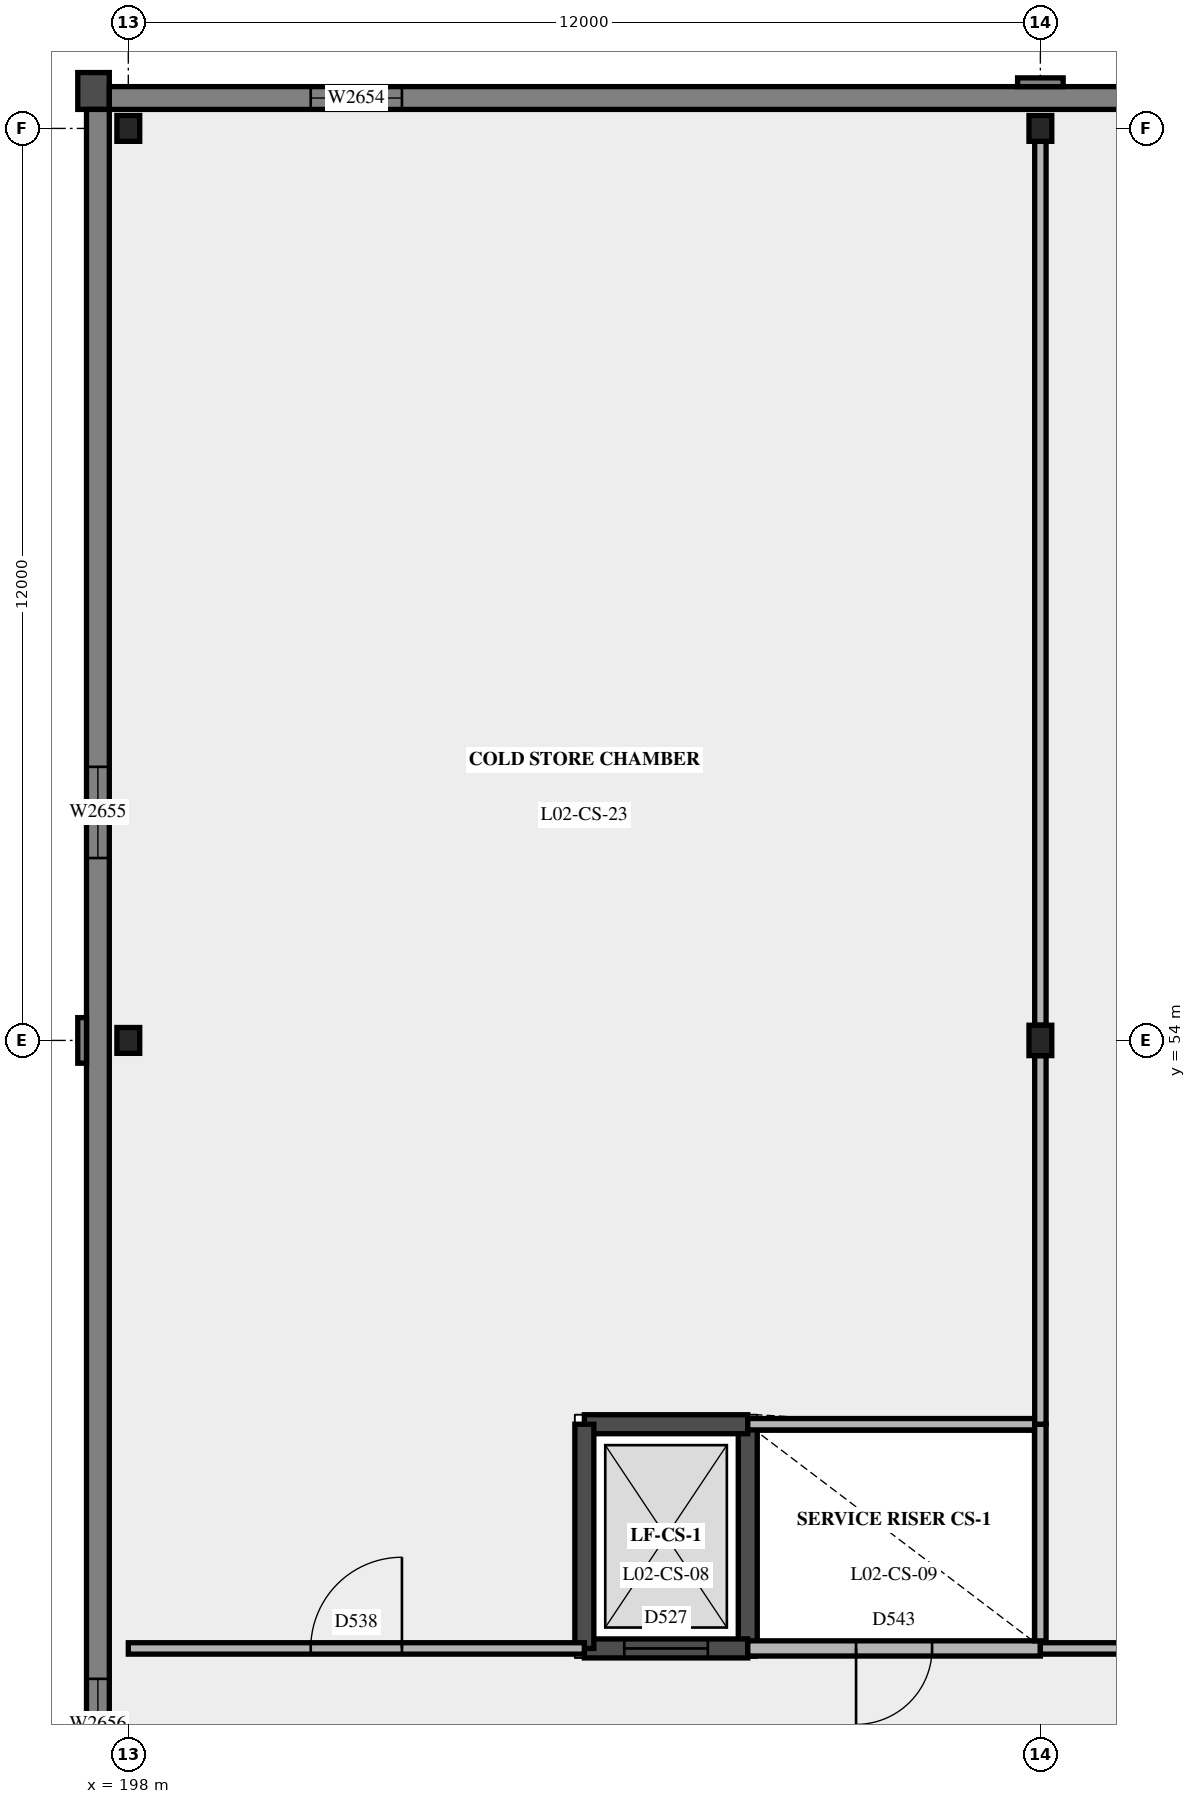
"""IFC4 building model, lengths in metres.
Left out: names, types, materials, properties, quantities, classifications, styles, units other than length and angle.
Written with IfcOpenShell. Run it as: python <this file> out.ifc"""

import sys

from ifc_helpers import new_model, si_unit, direction, frame, frame_2d, origin, origin_2d, place, context, subcontext, project, spatial, polyline, rectangle, i_section, outline, extrude, element, fill, save


model = new_model("IFC4")
c1 = context("Model", 3, precision=1e-05, world=origin(), true_north=direction((0.0, 1.0)))
c2 = subcontext(c1, "Body", "Model", "MODEL_VIEW")
j1 = project(units=[si_unit("LENGTHUNIT", "METRE"), si_unit("PLANEANGLEUNIT", "RADIAN")], contexts=[c1])
p1 = place(None, origin())
s1 = spatial("IfcSite", under=j1, at=p1, CompositionType="ELEMENT")
p2 = place(p1, origin())
s2 = spatial("IfcBuilding", under=s1, at=p2, CompositionType="ELEMENT")
p3 = place(p2, frame((0.0, 0.0, 10.8)))
s3 = spatial("IfcBuildingStorey", under=s2, at=p3, CompositionType="ELEMENT", Elevation=10.8)
for number, where, z_axis, x_axis in (
    (1, (198.0, 54.0, 0.0), (0.0, 0.0, 1.0), (1.0, 0.0, 0.0)),
    (2, (198.0, 66.0, 0.0), (0.0, 0.0, 1.0), (1.0, 0.0, 0.0)),
):
    element("IfcColumn", number, at=place(p3, frame(where, z_axis=z_axis, x_axis=x_axis)), inside=s3, PredefinedType="COLUMN", context=c2, shape_type="SweptSolid", body=[
        extrude(i_section(OverallWidth=0.3, OverallDepth=0.34, WebThickness=0.012, FlangeThickness=0.021, at=origin_2d()), origin(), (0.0, 0.0, 1.0), 5.4),
    ])
p4 = place(p3, frame((210.0, 54.0, 0.0), z_axis=(0.0, 0.0, 1.0), x_axis=(1.0, 0.0, 0.0)))
e3 = element("IfcColumn", 3, at=p4, inside=s3, PredefinedType="COLUMN", context=c2, shape_type="SweptSolid", body=[
    extrude(i_section(OverallWidth=0.3, OverallDepth=0.4, WebThickness=0.013, FlangeThickness=0.024, at=origin_2d()), origin(), (0.0, 0.0, 1.0), 5.4),
])
p5 = place(p3, frame((210.0, 66.0, 0.0), z_axis=(0.0, 0.0, 1.0), x_axis=(1.0, 0.0, 0.0)))
e4 = element("IfcColumn", 4, at=p5, inside=s3, PredefinedType="COLUMN", context=c2, shape_type="SweptSolid", body=[
    extrude(i_section(OverallWidth=0.3, OverallDepth=0.34, WebThickness=0.012, FlangeThickness=0.021, at=origin_2d()), origin(), (0.0, 0.0, 1.0), 5.4),
])
p6 = place(p3, frame((197.75, 66.492, 0.0), z_axis=(0.0, 0.0, 1.0), x_axis=(-1.0, 0.0, 0.0)))
e5 = element("IfcWall", 5, at=p6, inside=s3, PredefinedType="SOLIDWALL", context=c2, shape_type="SweptSolid", body=[
    extrude(rectangle(XDim=0.415, YDim=0.485, at=frame_2d((0.208, 0.0))), origin(), (0.0, 0.0, 1.0), 5.01),
])
p7 = place(p3, frame((197.75, 66.528, 5.01), z_axis=(0.0, 0.0, 1.0), x_axis=(-1.0, 0.0, 0.0)))
e6 = element("IfcWall", 6, at=p7, inside=s3, PredefinedType="SOLIDWALL", context=c2, shape_type="SweptSolid", body=[
    extrude(rectangle(XDim=0.53, YDim=0.555, at=frame_2d((0.265, 0.0))), origin(), (0.0, 0.0, 1.0), 0.13),
])
p8 = place(p3, frame((197.75, 66.562, 5.14), z_axis=(0.0, 0.0, 1.0), x_axis=(-1.0, 0.0, 0.0)))
e7 = element("IfcWall", 7, at=p8, inside=s3, PredefinedType="SOLIDWALL", context=c2, shape_type="SweptSolid", body=[
    extrude(rectangle(XDim=0.645, YDim=0.625, at=frame_2d((0.323, 0.0))), origin(), (0.0, 0.0, 1.0), 0.13),
])
p9 = place(p3, frame((197.75, 66.597, 5.27), z_axis=(0.0, 0.0, 1.0), x_axis=(-1.0, 0.0, 0.0)))
e8 = element("IfcWall", 8, at=p9, inside=s3, PredefinedType="SOLIDWALL", context=c2, shape_type="SweptSolid", body=[
    extrude(rectangle(XDim=0.76, YDim=0.695, at=frame_2d((0.38, 0.0))), origin(), (0.0, 0.0, 1.0), 0.13),
])
p10 = place(p3, frame((282.25, 66.4, 0.0), z_axis=(0.0, 0.0, 1.0), x_axis=(-1.0, 0.0, 0.0)))
e9 = element("IfcWall", 9, at=p10, inside=s3, PredefinedType="SOLIDWALL", context=c2, shape_type="SweptSolid", body=[
    extrude(rectangle(XDim=84.5, YDim=0.3, at=frame_2d((42.25, 0.0))), origin(), (0.0, 0.0, 1.0), 5.4),
])
p11 = place(p10, frame((8.65, 0.0, 1.2)))
e10 = element("IfcOpeningElement", 10, at=p11, cuts=e9, PredefinedType="OPENING", context=c2, shape_type="SweptSolid", body=[
    extrude(rectangle(XDim=1.2, YDim=1.5, at=frame_2d((0.6, 0.75))), frame((0.0, 0.16, 0.0), z_axis=(0.0, -1.0, 0.0), x_axis=(1.0, 0.0, 0.0)), (0.0, 0.0, 1.0), 0.32),
])
p12 = place(p10, frame((20.65, 0.0, 1.2)))
e11 = element("IfcOpeningElement", 11, at=p12, cuts=e9, PredefinedType="OPENING", context=c2, shape_type="SweptSolid", body=[
    extrude(rectangle(XDim=1.2, YDim=1.5, at=frame_2d((0.6, 0.75))), frame((0.0, 0.16, 0.0), z_axis=(0.0, -1.0, 0.0), x_axis=(1.0, 0.0, 0.0)), (0.0, 0.0, 1.0), 0.32),
])
p13 = place(p10, frame((32.65, 0.0, 1.2)))
e12 = element("IfcOpeningElement", 12, at=p13, cuts=e9, PredefinedType="OPENING", context=c2, shape_type="SweptSolid", body=[
    extrude(rectangle(XDim=1.2, YDim=1.5, at=frame_2d((0.6, 0.75))), frame((0.0, 0.16, 0.0), z_axis=(0.0, -1.0, 0.0), x_axis=(1.0, 0.0, 0.0)), (0.0, 0.0, 1.0), 0.32),
])
p14 = place(p10, frame((44.65, 0.0, 1.2)))
e13 = element("IfcOpeningElement", 13, at=p14, cuts=e9, PredefinedType="OPENING", context=c2, shape_type="SweptSolid", body=[
    extrude(rectangle(XDim=1.2, YDim=1.5, at=frame_2d((0.6, 0.75))), frame((0.0, 0.16, 0.0), z_axis=(0.0, -1.0, 0.0), x_axis=(1.0, 0.0, 0.0)), (0.0, 0.0, 1.0), 0.32),
])
p15 = place(p10, frame((56.65, 0.0, 1.2)))
e14 = element("IfcOpeningElement", 14, at=p15, cuts=e9, PredefinedType="OPENING", context=c2, shape_type="SweptSolid", body=[
    extrude(rectangle(XDim=1.2, YDim=1.5, at=frame_2d((0.6, 0.75))), frame((0.0, 0.16, 0.0), z_axis=(0.0, -1.0, 0.0), x_axis=(1.0, 0.0, 0.0)), (0.0, 0.0, 1.0), 0.32),
])
p16 = place(p10, frame((68.65, 0.0, 1.2)))
e15 = element("IfcOpeningElement", 15, at=p16, cuts=e9, PredefinedType="OPENING", context=c2, shape_type="SweptSolid", body=[
    extrude(rectangle(XDim=1.2, YDim=1.5, at=frame_2d((0.6, 0.75))), frame((0.0, 0.16, 0.0), z_axis=(0.0, -1.0, 0.0), x_axis=(1.0, 0.0, 0.0)), (0.0, 0.0, 1.0), 0.32),
])
p17 = place(p10, frame((80.65, 0.0, 1.2)))
e16 = element("IfcOpeningElement", 16, at=p17, cuts=e9, PredefinedType="OPENING", context=c2, shape_type="SweptSolid", body=[
    extrude(rectangle(XDim=1.2, YDim=1.5, at=frame_2d((0.6, 0.75))), frame((0.0, 0.16, 0.0), z_axis=(0.0, -1.0, 0.0), x_axis=(1.0, 0.0, 0.0)), (0.0, 0.0, 1.0), 0.32),
])
p18 = place(p3, frame((210.3, 66.607, 0.0), z_axis=(0.0, 0.0, 1.0), x_axis=(-1.0, 0.0, 0.0)))
e17 = element("IfcWall", 17, at=p18, inside=s3, PredefinedType="SOLIDWALL", context=c2, shape_type="SweptSolid", body=[
    extrude(rectangle(XDim=0.6, YDim=0.115, at=frame_2d((0.3, 0.0))), origin(), (0.0, 0.0, 1.0), 5.4),
])
p19 = place(p3, frame((197.6, 66.25, 0.0), z_axis=(0.0, 0.0, 1.0), x_axis=(0.0, -1.0, 0.0)))
e18 = element("IfcWall", 18, at=p19, inside=s3, PredefinedType="SOLIDWALL", context=c2, shape_type="SweptSolid", body=[
    extrude(rectangle(XDim=48.5, YDim=0.3, at=frame_2d((24.25, 0.0))), origin(), (0.0, 0.0, 1.0), 5.4),
])
p20 = place(p19, frame((8.65, 0.0, 1.2)))
e19 = element("IfcOpeningElement", 19, at=p20, cuts=e18, PredefinedType="OPENING", context=c2, shape_type="SweptSolid", body=[
    extrude(rectangle(XDim=1.2, YDim=1.5, at=frame_2d((0.6, 0.75))), frame((0.0, 0.16, 0.0), z_axis=(0.0, -1.0, 0.0), x_axis=(1.0, 0.0, 0.0)), (0.0, 0.0, 1.0), 0.32),
])
p21 = place(p19, frame((20.65, 0.0, 1.2)))
e20 = element("IfcOpeningElement", 20, at=p21, cuts=e18, PredefinedType="OPENING", context=c2, shape_type="SweptSolid", body=[
    extrude(rectangle(XDim=1.2, YDim=1.5, at=frame_2d((0.6, 0.75))), frame((0.0, 0.16, 0.0), z_axis=(0.0, -1.0, 0.0), x_axis=(1.0, 0.0, 0.0)), (0.0, 0.0, 1.0), 0.32),
])
p22 = place(p19, frame((32.65, 0.0, 1.2)))
e21 = element("IfcOpeningElement", 21, at=p22, cuts=e18, PredefinedType="OPENING", context=c2, shape_type="SweptSolid", body=[
    extrude(rectangle(XDim=1.2, YDim=1.5, at=frame_2d((0.6, 0.75))), frame((0.0, 0.16, 0.0), z_axis=(0.0, -1.0, 0.0), x_axis=(1.0, 0.0, 0.0)), (0.0, 0.0, 1.0), 0.32),
])
p23 = place(p19, frame((44.65, 0.0, 1.2)))
e22 = element("IfcOpeningElement", 22, at=p23, cuts=e18, PredefinedType="OPENING", context=c2, shape_type="SweptSolid", body=[
    extrude(rectangle(XDim=1.2, YDim=1.5, at=frame_2d((0.6, 0.75))), frame((0.0, 0.16, 0.0), z_axis=(0.0, -1.0, 0.0), x_axis=(1.0, 0.0, 0.0)), (0.0, 0.0, 1.0), 0.32),
])
p24 = place(p3, frame((197.393, 54.3, 0.0), z_axis=(0.0, 0.0, 1.0), x_axis=(0.0, -1.0, 0.0)))
e23 = element("IfcWall", 23, at=p24, inside=s3, PredefinedType="SOLIDWALL", context=c2, shape_type="SweptSolid", body=[
    extrude(rectangle(XDim=0.6, YDim=0.115, at=frame_2d((0.3, 0.0))), origin(), (0.0, 0.0, 1.0), 5.4),
])
p25 = place(p3, frame((206.15, 46.0, 0.0), z_axis=(0.0, 0.0, 1.0), x_axis=(0.0, 1.0, 0.0)))
e24 = element("IfcWall", 24, at=p25, inside=s3, PredefinedType="SHEAR", context=c2, shape_type="SweptSolid", body=[
    extrude(rectangle(XDim=2.95, YDim=0.25, at=frame_2d((1.475, 0.0))), origin(), (0.0, 0.0, 1.0), 5.4),
])
p26 = place(p3, frame((206.15, 48.95, 0.0), z_axis=(0.0, 0.0, 1.0), x_axis=(-1.0, 0.0, 0.0)))
e25 = element("IfcWall", 25, at=p26, inside=s3, PredefinedType="SHEAR", context=c2, shape_type="SweptSolid", body=[
    extrude(rectangle(XDim=2.15, YDim=0.25, at=frame_2d((1.075, 0.0))), origin(), (0.0, 0.0, 1.0), 5.4),
])
p27 = place(p3, frame((204.0, 46.0, 0.0), z_axis=(0.0, 0.0, 1.0), x_axis=(1.0, 0.0, 0.0)))
e26 = element("IfcWall", 26, at=p27, inside=s3, PredefinedType="SHEAR", context=c2, shape_type="SweptSolid", body=[
    extrude(rectangle(XDim=2.15, YDim=0.25, at=frame_2d((1.075, 0.0))), origin(), (0.0, 0.0, 1.0), 5.4),
])
p28 = place(p27, frame((0.525, 0.0, 0.0)))
e27 = element("IfcOpeningElement", 27, at=p28, cuts=e26, PredefinedType="OPENING", context=c2, shape_type="SweptSolid", body=[
    extrude(rectangle(XDim=1.1, YDim=2.1, at=frame_2d((0.55, 1.05))), frame((0.0, 0.135, 0.0), z_axis=(0.0, -1.0, 0.0), x_axis=(1.0, 0.0, 0.0)), (0.0, 0.0, 1.0), 0.27),
])
p29 = place(p3, frame((204.0, 48.95, 0.0), z_axis=(0.0, 0.0, 1.0), x_axis=(0.0, -1.0, 0.0)))
e28 = element("IfcWall", 28, at=p29, inside=s3, PredefinedType="SHEAR", context=c2, shape_type="SweptSolid", body=[
    extrude(rectangle(XDim=2.95, YDim=0.25, at=frame_2d((1.475, 0.0))), origin(), (0.0, 0.0, 1.0), 5.4),
])
p30 = place(p3, frame((198.0, 46.0, 0.0), z_axis=(0.0, 0.0, 1.0), x_axis=(1.0, 0.0, 0.0)))
e29 = element("IfcWall", 29, at=p30, inside=s3, PredefinedType="PARTITIONING", context=c2, shape_type="SweptSolid", body=[
    extrude(outline(polyline([(0.0, 0.0), (6.0, 0.0), (6.0, 5.15), (4.905, 5.15), (4.9, 4.63), (4.7, 4.63), (4.695, 5.15), (2.505, 5.15), (2.5, 4.63), (2.3, 4.63), (2.295, 5.15), (0.1, 5.15), (0.095, 4.68), (0.0, 4.68), (0.0, 0.0)])), frame((0.0, 0.075, 0.0), z_axis=(0.0, -1.0, 0.0), x_axis=(1.0, 0.0, 0.0)), (0.0, 0.0, 1.0), 0.15),
])
p31 = place(p30, frame((2.4, 0.0, 0.0)))
e30 = element("IfcOpeningElement", 30, at=p31, cuts=e29, PredefinedType="OPENING", context=c2, shape_type="SweptSolid", body=[
    extrude(rectangle(XDim=1.2, YDim=2.4, at=frame_2d((0.6, 1.2))), frame((0.0, 0.085, 0.0), z_axis=(0.0, -1.0, 0.0), x_axis=(1.0, 0.0, 0.0)), (0.0, 0.0, 1.0), 0.17),
])
p32 = place(p3, frame((206.15, 46.0, 0.0), z_axis=(0.0, 0.0, 1.0), x_axis=(1.0, 0.0, 0.0)))
e31 = element("IfcWall", 31, at=p32, inside=s3, PredefinedType="PARTITIONING", context=c2, shape_type="SweptSolid", body=[
    extrude(outline(polyline([(0.0, 0.0), (3.85, 0.0), (3.85, 4.68), (3.755, 4.68), (3.75, 5.15), (1.555, 5.15), (1.55, 4.63), (1.35, 4.63), (1.345, 5.15), (0.0, 5.15), (0.0, 0.0)])), frame((0.0, 0.1, 0.0), z_axis=(0.0, -1.0, 0.0), x_axis=(1.0, 0.0, 0.0)), (0.0, 0.0, 1.0), 0.2),
])
p33 = place(p32, frame((1.425, 0.0, 0.0)))
e32 = element("IfcOpeningElement", 32, at=p33, cuts=e31, PredefinedType="OPENING", context=c2, shape_type="SweptSolid", body=[
    extrude(rectangle(XDim=1.0, YDim=2.1, at=frame_2d((0.5, 1.05))), frame((0.0, 0.11, 0.0), z_axis=(0.0, -1.0, 0.0), x_axis=(1.0, 0.0, 0.0)), (0.0, 0.0, 1.0), 0.22),
])
p34 = place(p3, frame((210.0, 46.0, 0.0), z_axis=(0.0, 0.0, 1.0), x_axis=(1.0, 0.0, 0.0)))
e33 = element("IfcWall", 33, at=p34, inside=s3, PredefinedType="PARTITIONING", context=c2, shape_type="SweptSolid", body=[
    extrude(outline(polyline([(0.0, 0.0), (12.0, 0.0), (12.0, 5.15), (9.705, 5.15), (9.7, 4.63), (9.5, 4.63), (9.495, 5.15), (7.305, 5.15), (7.3, 4.63), (7.1, 4.63), (7.095, 5.15), (4.905, 5.15), (4.9, 4.63), (4.7, 4.63), (4.695, 5.15), (2.505, 5.15), (2.5, 4.63), (2.3, 4.63), (2.295, 5.15), (0.1, 5.15), (0.095, 4.68), (0.0, 4.68), (0.0, 0.0)])), frame((0.0, 0.075, 0.0), z_axis=(0.0, -1.0, 0.0), x_axis=(1.0, 0.0, 0.0)), (0.0, 0.0, 1.0), 0.15),
])
p35 = place(p34, frame((5.4, 0.0, 0.0)))
e34 = element("IfcOpeningElement", 34, at=p35, cuts=e33, PredefinedType="OPENING", context=c2, shape_type="SweptSolid", body=[
    extrude(rectangle(XDim=1.2, YDim=2.4, at=frame_2d((0.6, 1.2))), frame((0.0, 0.085, 0.0), z_axis=(0.0, -1.0, 0.0), x_axis=(1.0, 0.0, 0.0)), (0.0, 0.0, 1.0), 0.17),
])
p36 = place(p3, frame((206.15, 48.95, 0.0), z_axis=(0.0, 0.0, 1.0), x_axis=(1.0, 0.0, 0.0)))
e35 = element("IfcWall", 35, at=p36, inside=s3, PredefinedType="PARTITIONING", context=c2, shape_type="SweptSolid", body=[
    extrude(outline(polyline([(0.0, 0.0), (3.775, 0.0), (3.775, 4.68), (3.755, 4.68), (3.75, 5.15), (1.555, 5.15), (1.55, 4.63), (1.35, 4.63), (1.345, 5.15), (0.0, 5.15), (0.0, 0.0)])), frame((0.0, 0.075, 0.0), z_axis=(0.0, -1.0, 0.0), x_axis=(1.0, 0.0, 0.0)), (0.0, 0.0, 1.0), 0.15),
])
p37 = place(p3, frame((210.0, 46.1, 0.0), z_axis=(0.0, 0.0, 1.0), x_axis=(0.0, 1.0, 0.0)))
e36 = element("IfcWall", 36, at=p37, inside=s3, PredefinedType="PARTITIONING", context=c2, shape_type="SweptSolid", body=[
    extrude(rectangle(XDim=2.85, YDim=0.15, at=frame_2d((1.425, 0.0))), origin(), (0.0, 0.0, 1.0), 4.68),
])
p38 = place(p3, frame((210.0, 48.95, 0.0), z_axis=(0.0, 0.0, 1.0), x_axis=(0.0, 1.0, 0.0)))
e37 = element("IfcWall", 37, at=p38, inside=s3, PredefinedType="PARTITIONING", context=c2, shape_type="SweptSolid", body=[
    extrude(rectangle(XDim=4.85, YDim=0.15, at=frame_2d((2.425, 0.0))), origin(), (0.0, 0.0, 1.0), 4.68),
])
p39 = place(p3, frame((210.0, 54.2, 0.0), z_axis=(0.0, 0.0, 1.0), x_axis=(0.0, 1.0, 0.0)))
e38 = element("IfcWall", 38, at=p39, inside=s3, PredefinedType="PARTITIONING", context=c2, shape_type="SweptSolid", body=[
    extrude(rectangle(XDim=11.63, YDim=0.15, at=frame_2d((5.815, 0.0))), origin(), (0.0, 0.0, 1.0), 4.68),
])
p40 = place(p17, origin())
e39 = element("IfcWindow", 39, at=p40, inside=s3, PartitioningType="SINGLE_PANEL", PredefinedType="WINDOW", context=c2, shape_type="SweptSolid", body=[
    extrude(rectangle(XDim=1.2, YDim=1.5, at=frame_2d((0.6, 0.75))), frame((0.0, 0.03, 0.0), z_axis=(0.0, -1.0, 0.0), x_axis=(1.0, 0.0, 0.0)), (0.0, 0.0, 1.0), 0.06),
])
fill(e16, e39)
p41 = place(p20, origin())
e40 = element("IfcWindow", 40, at=p41, inside=s3, PartitioningType="SINGLE_PANEL", PredefinedType="WINDOW", context=c2, shape_type="SweptSolid", body=[
    extrude(rectangle(XDim=1.2, YDim=1.5, at=frame_2d((0.6, 0.75))), frame((0.0, 0.03, 0.0), z_axis=(0.0, -1.0, 0.0), x_axis=(1.0, 0.0, 0.0)), (0.0, 0.0, 1.0), 0.06),
])
fill(e19, e40)
p42 = place(p21, origin())
e41 = element("IfcWindow", 41, at=p42, inside=s3, PartitioningType="SINGLE_PANEL", PredefinedType="WINDOW", context=c2, shape_type="SweptSolid", body=[
    extrude(rectangle(XDim=1.2, YDim=1.5, at=frame_2d((0.6, 0.75))), frame((0.0, 0.03, 0.0), z_axis=(0.0, -1.0, 0.0), x_axis=(1.0, 0.0, 0.0)), (0.0, 0.0, 1.0), 0.06),
])
fill(e20, e41)
p43 = place(p28, origin())
e42 = element("IfcDoor", 42, at=p43, inside=s3, OperationType="SLIDING_TO_LEFT", PredefinedType="DOOR", context=c2, shape_type="SweptSolid", body=[
    extrude(rectangle(XDim=1.1, YDim=2.1, at=frame_2d((0.55, 1.05))), frame((0.0, 0.025, 0.0), z_axis=(0.0, -1.0, 0.0), x_axis=(1.0, 0.0, 0.0)), (0.0, 0.0, 1.0), 0.05),
])
fill(e27, e42)
p44 = place(p31, origin())
e43 = element("IfcDoor", 43, at=p44, inside=s3, OperationType="SINGLE_SWING_RIGHT", PredefinedType="DOOR", context=c2, shape_type="SweptSolid", body=[
    extrude(rectangle(XDim=1.2, YDim=2.4, at=frame_2d((0.6, 1.2))), frame((0.0, 0.025, 0.0), z_axis=(0.0, -1.0, 0.0), x_axis=(1.0, 0.0, 0.0)), (0.0, 0.0, 1.0), 0.05),
])
fill(e30, e43)
p45 = place(p33, origin())
e44 = element("IfcDoor", 44, at=p45, inside=s3, OperationType="SINGLE_SWING_RIGHT", PredefinedType="DOOR", context=c2, shape_type="SweptSolid", body=[
    extrude(rectangle(XDim=1.0, YDim=2.1, at=frame_2d((0.5, 1.05))), frame((0.0, 0.025, 0.0), z_axis=(0.0, -1.0, 0.0), x_axis=(1.0, 0.0, 0.0)), (0.0, 0.0, 1.0), 0.05),
])
fill(e32, e44)
save(model, sys.argv[1])
